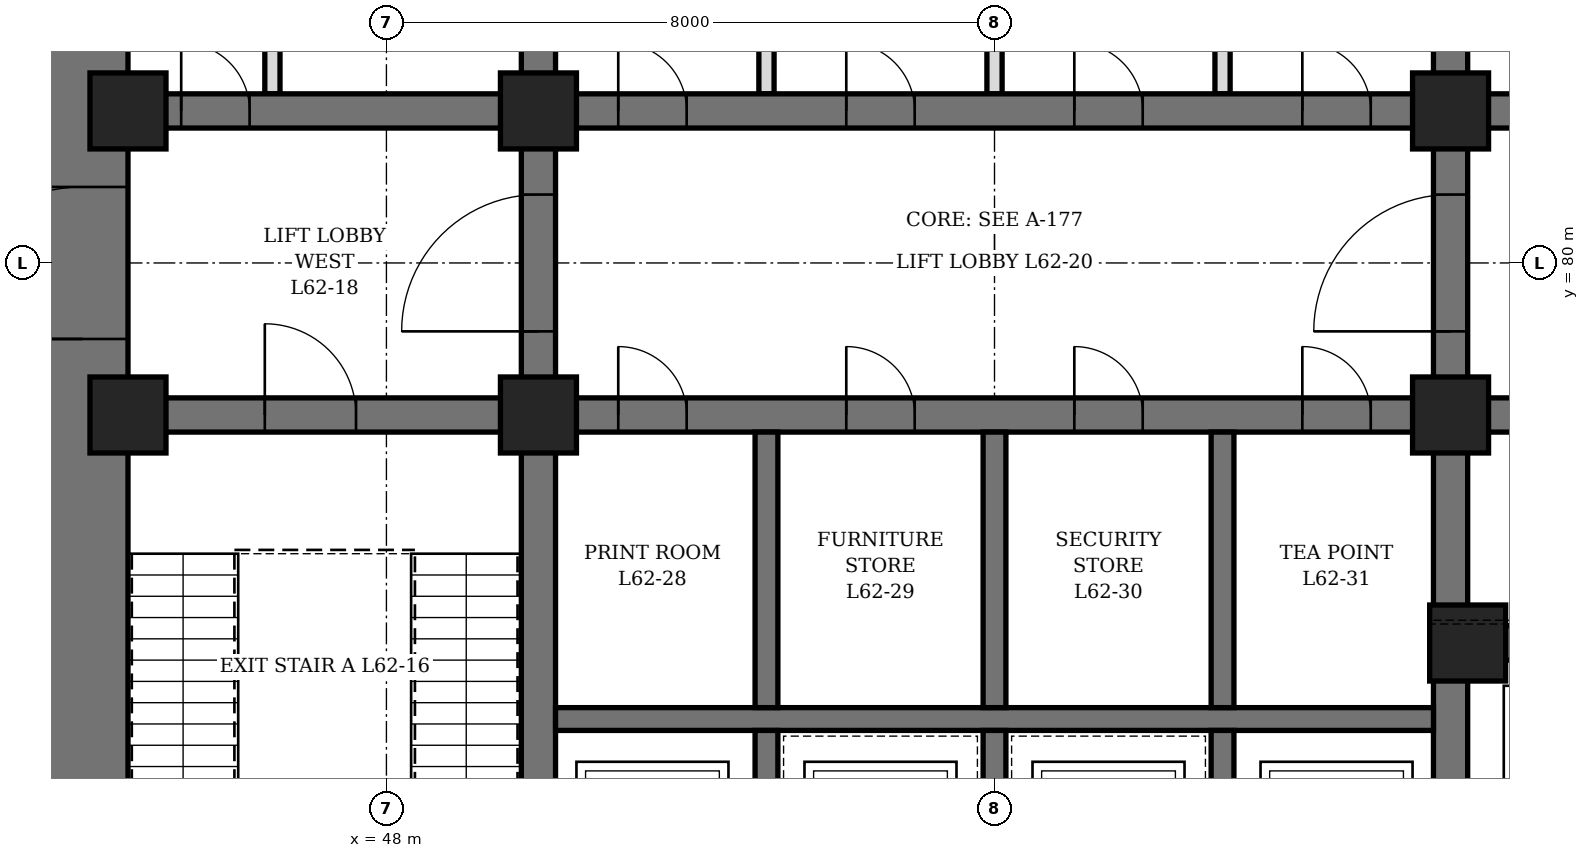
"""IFC4 building model, lengths in metres.
Left out: names, types, materials, properties, quantities, classifications, styles, units other than length and angle.
Written with IfcOpenShell. Run it as: python <this file> out.ifc"""

import sys

from ifc_helpers import new_model, si_unit, direction, frame, frame_2d, origin, origin_2d, place, context, subcontext, project, spatial, rectangle, hollow_rectangle, extrude, element, fill, save


model = new_model("IFC4")
c1 = context("Model", 3, precision=1e-05, world=origin(), true_north=direction((0.0, 1.0)))
c2 = subcontext(c1, "Body", "Model", "MODEL_VIEW")
j1 = project(units=[si_unit("LENGTHUNIT", "METRE"), si_unit("PLANEANGLEUNIT", "RADIAN")], contexts=[c1])
p1 = place(None, origin())
s1 = spatial("IfcSite", under=j1, at=p1, CompositionType="ELEMENT")
p2 = place(p1, origin())
s2 = spatial("IfcBuilding", under=s1, at=p2, CompositionType="ELEMENT")
p3 = place(p2, frame((0.0, 0.0, 275.5)))
s3 = spatial("IfcBuildingStorey", under=s2, at=p3, CompositionType="ELEMENT", Elevation=275.5)
p4 = place(p3, frame((44.0, 70.4, 0.0), z_axis=(0.0, 0.0, 1.0), x_axis=(0.0, 1.0, 0.0)))
e1 = element("IfcWall", 1, at=p4, inside=s3, PredefinedType="SHEAR", context=c2, shape_type="SweptSolid", body=[
    extrude(rectangle(XDim=19.2, YDim=1.2, at=frame_2d((9.6, 0.0))), origin(), (0.0, 0.0, 1.0), 4.2),
])
p5 = place(p4, frame((8.6, 0.0, 0.0)))
e2 = element("IfcOpeningElement", 2, at=p5, cuts=e1, PredefinedType="OPENING", context=c2, shape_type="SweptSolid", body=[
    extrude(rectangle(XDim=2.0, YDim=2.4, at=frame_2d((1.0, 1.2))), frame((0.0, 0.61, 0.0), z_axis=(0.0, -1.0, 0.0), x_axis=(1.0, 0.0, 0.0)), (0.0, 0.0, 1.0), 1.22),
])
p6 = place(p3, frame((50.0, 71.6, 0.0), z_axis=(0.0, 0.0, 1.0), x_axis=(0.0, 1.0, 0.0)))
e3 = element("IfcWall", 3, at=p6, inside=s3, PredefinedType="SHEAR", context=c2, shape_type="SweptSolid", body=[
    extrude(rectangle(XDim=16.8, YDim=0.45, at=frame_2d((8.4, 0.0))), origin(), (0.0, 0.0, 1.0), 4.2),
])
p7 = place(p6, frame((7.5, 0.0, 0.0)))
e4 = element("IfcOpeningElement", 4, at=p7, cuts=e3, PredefinedType="OPENING", context=c2, shape_type="SweptSolid", body=[
    extrude(rectangle(XDim=1.8, YDim=2.4, at=frame_2d((0.9, 1.2))), frame((0.0, 0.235, 0.0), z_axis=(0.0, -1.0, 0.0), x_axis=(1.0, 0.0, 0.0)), (0.0, 0.0, 1.0), 0.47),
])
p8 = place(p3, frame((62.0, 71.6, 0.0), z_axis=(0.0, 0.0, 1.0), x_axis=(0.0, 1.0, 0.0)))
e5 = element("IfcWall", 5, at=p8, inside=s3, PredefinedType="SHEAR", context=c2, shape_type="SweptSolid", body=[
    extrude(rectangle(XDim=16.8, YDim=0.45, at=frame_2d((8.4, 0.0))), origin(), (0.0, 0.0, 1.0), 4.2),
])
p9 = place(p8, frame((7.5, 0.0, 0.0)))
e6 = element("IfcOpeningElement", 6, at=p9, cuts=e5, PredefinedType="OPENING", context=c2, shape_type="SweptSolid", body=[
    extrude(rectangle(XDim=1.8, YDim=2.4, at=frame_2d((0.9, 1.2))), frame((0.0, 0.235, 0.0), z_axis=(0.0, -1.0, 0.0), x_axis=(1.0, 0.0, 0.0)), (0.0, 0.0, 1.0), 0.47),
])
p10 = place(p3, frame((44.6, 78.0, 0.0), z_axis=(0.0, 0.0, 1.0), x_axis=(1.0, 0.0, 0.0)))
e7 = element("IfcWall", 7, at=p10, inside=s3, PredefinedType="SHEAR", context=c2, shape_type="SweptSolid", body=[
    extrude(rectangle(XDim=5.175, YDim=0.45, at=frame_2d((2.587, 0.0))), origin(), (0.0, 0.0, 1.0), 4.2),
])
p11 = place(p10, frame((1.8, 0.0, 0.0)))
e8 = element("IfcOpeningElement", 8, at=p11, cuts=e7, PredefinedType="OPENING", context=c2, shape_type="SweptSolid", body=[
    extrude(rectangle(XDim=1.2, YDim=2.1, at=frame_2d((0.6, 1.05))), frame((0.0, 0.235, 0.0), z_axis=(0.0, -1.0, 0.0), x_axis=(1.0, 0.0, 0.0)), (0.0, 0.0, 1.0), 0.47),
])
p12 = place(p3, frame((44.6, 82.0, 0.0), z_axis=(0.0, 0.0, 1.0), x_axis=(1.0, 0.0, 0.0)))
e9 = element("IfcWall", 9, at=p12, inside=s3, PredefinedType="SHEAR", context=c2, shape_type="SweptSolid", body=[
    extrude(rectangle(XDim=5.175, YDim=0.45, at=frame_2d((2.587, 0.0))), origin(), (0.0, 0.0, 1.0), 4.2),
])
p13 = place(p12, frame((0.7, 0.0, 0.0)))
e10 = element("IfcOpeningElement", 10, at=p13, cuts=e9, PredefinedType="OPENING", context=c2, shape_type="SweptSolid", body=[
    extrude(rectangle(XDim=0.9, YDim=2.1, at=frame_2d((0.45, 1.05))), frame((0.0, 0.235, 0.0), z_axis=(0.0, -1.0, 0.0), x_axis=(1.0, 0.0, 0.0)), (0.0, 0.0, 1.0), 0.47),
])
p14 = place(p3, frame((62.225, 75.0, 0.0), z_axis=(0.0, 0.0, 1.0), x_axis=(1.0, 0.0, 0.0)))
e11 = element("IfcWall", 11, at=p14, inside=s3, PredefinedType="SHEAR", context=c2, shape_type="SweptSolid", body=[
    extrude(rectangle(XDim=5.175, YDim=0.45, at=frame_2d((2.587, 0.0))), origin(), (0.0, 0.0, 1.0), 4.2),
])
p15 = place(p14, frame((0.675, 0.0, 0.0)))
e12 = element("IfcOpeningElement", 12, at=p15, cuts=e11, PredefinedType="OPENING", context=c2, shape_type="SweptSolid", body=[
    extrude(rectangle(XDim=1.2, YDim=2.2, at=frame_2d((0.6, 1.1))), frame((0.0, 0.235, 0.0), z_axis=(0.0, -1.0, 0.0), x_axis=(1.0, 0.0, 0.0)), (0.0, 0.0, 1.0), 0.47),
])
p16 = place(p14, frame((3.425, 0.0, 0.0)))
e13 = element("IfcOpeningElement", 13, at=p16, cuts=e11, PredefinedType="OPENING", context=c2, shape_type="SweptSolid", body=[
    extrude(rectangle(XDim=1.2, YDim=2.2, at=frame_2d((0.6, 1.1))), frame((0.0, 0.235, 0.0), z_axis=(0.0, -1.0, 0.0), x_axis=(1.0, 0.0, 0.0)), (0.0, 0.0, 1.0), 0.47),
])
p17 = place(p3, frame((62.225, 78.0, 0.0), z_axis=(0.0, 0.0, 1.0), x_axis=(1.0, 0.0, 0.0)))
e14 = element("IfcWall", 14, at=p17, inside=s3, PredefinedType="SHEAR", context=c2, shape_type="SweptSolid", body=[
    extrude(rectangle(XDim=5.175, YDim=0.45, at=frame_2d((2.587, 0.0))), origin(), (0.0, 0.0, 1.0), 4.2),
])
p18 = place(p17, frame((2.175, 0.0, 0.0)))
e15 = element("IfcOpeningElement", 15, at=p18, cuts=e14, PredefinedType="OPENING", context=c2, shape_type="SweptSolid", body=[
    extrude(rectangle(XDim=1.2, YDim=2.1, at=frame_2d((0.6, 1.05))), frame((0.0, 0.235, 0.0), z_axis=(0.0, -1.0, 0.0), x_axis=(1.0, 0.0, 0.0)), (0.0, 0.0, 1.0), 0.47),
])
p19 = place(p3, frame((62.225, 82.0, 0.0), z_axis=(0.0, 0.0, 1.0), x_axis=(1.0, 0.0, 0.0)))
e16 = element("IfcWall", 16, at=p19, inside=s3, PredefinedType="SHEAR", context=c2, shape_type="SweptSolid", body=[
    extrude(rectangle(XDim=5.175, YDim=0.45, at=frame_2d((2.587, 0.0))), origin(), (0.0, 0.0, 1.0), 4.2),
])
p20 = place(p19, frame((2.175, 0.0, 0.0)))
e17 = element("IfcOpeningElement", 17, at=p20, cuts=e16, PredefinedType="OPENING", context=c2, shape_type="SweptSolid", body=[
    extrude(rectangle(XDim=1.2, YDim=2.1, at=frame_2d((0.6, 1.05))), frame((0.0, 0.235, 0.0), z_axis=(0.0, -1.0, 0.0), x_axis=(1.0, 0.0, 0.0)), (0.0, 0.0, 1.0), 0.47),
])
p21 = place(p3, frame((50.225, 78.0, 0.0), z_axis=(0.0, 0.0, 1.0), x_axis=(1.0, 0.0, 0.0)))
e18 = element("IfcWall", 18, at=p21, inside=s3, PredefinedType="SHEAR", context=c2, shape_type="SweptSolid", body=[
    extrude(rectangle(XDim=11.55, YDim=0.45, at=frame_2d((5.775, 0.0))), origin(), (0.0, 0.0, 1.0), 4.2),
])
p22 = place(p21, frame((0.825, 0.0, 0.0)))
e19 = element("IfcOpeningElement", 19, at=p22, cuts=e18, PredefinedType="OPENING", context=c2, shape_type="SweptSolid", body=[
    extrude(rectangle(XDim=0.9, YDim=2.1, at=frame_2d((0.45, 1.05))), frame((0.0, 0.235, 0.0), z_axis=(0.0, -1.0, 0.0), x_axis=(1.0, 0.0, 0.0)), (0.0, 0.0, 1.0), 0.47),
])
p23 = place(p21, frame((3.825, 0.0, 0.0)))
e20 = element("IfcOpeningElement", 20, at=p23, cuts=e18, PredefinedType="OPENING", context=c2, shape_type="SweptSolid", body=[
    extrude(rectangle(XDim=0.9, YDim=2.1, at=frame_2d((0.45, 1.05))), frame((0.0, 0.235, 0.0), z_axis=(0.0, -1.0, 0.0), x_axis=(1.0, 0.0, 0.0)), (0.0, 0.0, 1.0), 0.47),
])
p24 = place(p21, frame((6.825, 0.0, 0.0)))
e21 = element("IfcOpeningElement", 21, at=p24, cuts=e18, PredefinedType="OPENING", context=c2, shape_type="SweptSolid", body=[
    extrude(rectangle(XDim=0.9, YDim=2.1, at=frame_2d((0.45, 1.05))), frame((0.0, 0.235, 0.0), z_axis=(0.0, -1.0, 0.0), x_axis=(1.0, 0.0, 0.0)), (0.0, 0.0, 1.0), 0.47),
])
p25 = place(p21, frame((9.825, 0.0, 0.0)))
e22 = element("IfcOpeningElement", 22, at=p25, cuts=e18, PredefinedType="OPENING", context=c2, shape_type="SweptSolid", body=[
    extrude(rectangle(XDim=0.9, YDim=2.1, at=frame_2d((0.45, 1.05))), frame((0.0, 0.235, 0.0), z_axis=(0.0, -1.0, 0.0), x_axis=(1.0, 0.0, 0.0)), (0.0, 0.0, 1.0), 0.47),
])
p26 = place(p3, frame((50.225, 82.0, 0.0), z_axis=(0.0, 0.0, 1.0), x_axis=(1.0, 0.0, 0.0)))
e23 = element("IfcWall", 23, at=p26, inside=s3, PredefinedType="SHEAR", context=c2, shape_type="SweptSolid", body=[
    extrude(rectangle(XDim=11.55, YDim=0.45, at=frame_2d((5.775, 0.0))), origin(), (0.0, 0.0, 1.0), 4.2),
])
p27 = place(p26, frame((0.825, 0.0, 0.0)))
e24 = element("IfcOpeningElement", 24, at=p27, cuts=e23, PredefinedType="OPENING", context=c2, shape_type="SweptSolid", body=[
    extrude(rectangle(XDim=0.9, YDim=2.1, at=frame_2d((0.45, 1.05))), frame((0.0, 0.235, 0.0), z_axis=(0.0, -1.0, 0.0), x_axis=(1.0, 0.0, 0.0)), (0.0, 0.0, 1.0), 0.47),
])
p28 = place(p26, frame((3.825, 0.0, 0.0)))
e25 = element("IfcOpeningElement", 25, at=p28, cuts=e23, PredefinedType="OPENING", context=c2, shape_type="SweptSolid", body=[
    extrude(rectangle(XDim=0.9, YDim=2.1, at=frame_2d((0.45, 1.05))), frame((0.0, 0.235, 0.0), z_axis=(0.0, -1.0, 0.0), x_axis=(1.0, 0.0, 0.0)), (0.0, 0.0, 1.0), 0.47),
])
p29 = place(p26, frame((6.825, 0.0, 0.0)))
e26 = element("IfcOpeningElement", 26, at=p29, cuts=e23, PredefinedType="OPENING", context=c2, shape_type="SweptSolid", body=[
    extrude(rectangle(XDim=0.9, YDim=2.1, at=frame_2d((0.45, 1.05))), frame((0.0, 0.235, 0.0), z_axis=(0.0, -1.0, 0.0), x_axis=(1.0, 0.0, 0.0)), (0.0, 0.0, 1.0), 0.47),
])
p30 = place(p26, frame((9.825, 0.0, 0.0)))
e27 = element("IfcOpeningElement", 27, at=p30, cuts=e23, PredefinedType="OPENING", context=c2, shape_type="SweptSolid", body=[
    extrude(rectangle(XDim=0.9, YDim=2.1, at=frame_2d((0.45, 1.05))), frame((0.0, 0.235, 0.0), z_axis=(0.0, -1.0, 0.0), x_axis=(1.0, 0.0, 0.0)), (0.0, 0.0, 1.0), 0.47),
])
p31 = place(p3, frame((50.225, 74.0, 0.0), z_axis=(0.0, 0.0, 1.0), x_axis=(1.0, 0.0, 0.0)))
e28 = element("IfcWall", 28, at=p31, inside=s3, PredefinedType="SHEAR", context=c2, shape_type="SweptSolid", body=[
    extrude(rectangle(XDim=11.55, YDim=0.3, at=frame_2d((5.775, 0.0))), origin(), (0.0, 0.0, 1.0), 4.2),
])
p32 = place(p3, frame((53.0, 71.6, 0.0), z_axis=(0.0, 0.0, 1.0), x_axis=(0.0, 1.0, 0.0)))
e29 = element("IfcWall", 29, at=p32, inside=s3, PredefinedType="SHEAR", context=c2, shape_type="SweptSolid", body=[
    extrude(rectangle(XDim=2.25, YDim=0.3, at=frame_2d((1.125, 0.0))), origin(), (0.0, 0.0, 1.0), 4.2),
])
p33 = place(p3, frame((53.0, 74.15, 0.0), z_axis=(0.0, 0.0, 1.0), x_axis=(0.0, 1.0, 0.0)))
e30 = element("IfcWall", 30, at=p33, inside=s3, PredefinedType="SHEAR", context=c2, shape_type="SweptSolid", body=[
    extrude(rectangle(XDim=3.625, YDim=0.3, at=frame_2d((1.812, 0.0))), origin(), (0.0, 0.0, 1.0), 4.2),
])
p34 = place(p3, frame((56.0, 71.6, 0.0), z_axis=(0.0, 0.0, 1.0), x_axis=(0.0, 1.0, 0.0)))
e31 = element("IfcWall", 31, at=p34, inside=s3, PredefinedType="SHEAR", context=c2, shape_type="SweptSolid", body=[
    extrude(rectangle(XDim=2.25, YDim=0.3, at=frame_2d((1.125, 0.0))), origin(), (0.0, 0.0, 1.0), 4.2),
])
p35 = place(p3, frame((56.0, 74.15, 0.0), z_axis=(0.0, 0.0, 1.0), x_axis=(0.0, 1.0, 0.0)))
e32 = element("IfcWall", 32, at=p35, inside=s3, PredefinedType="SHEAR", context=c2, shape_type="SweptSolid", body=[
    extrude(rectangle(XDim=3.625, YDim=0.3, at=frame_2d((1.812, 0.0))), origin(), (0.0, 0.0, 1.0), 4.2),
])
p36 = place(p3, frame((59.0, 71.6, 0.0), z_axis=(0.0, 0.0, 1.0), x_axis=(0.0, 1.0, 0.0)))
e33 = element("IfcWall", 33, at=p36, inside=s3, PredefinedType="SHEAR", context=c2, shape_type="SweptSolid", body=[
    extrude(rectangle(XDim=2.25, YDim=0.3, at=frame_2d((1.125, 0.0))), origin(), (0.0, 0.0, 1.0), 4.2),
])
p37 = place(p3, frame((59.0, 74.15, 0.0), z_axis=(0.0, 0.0, 1.0), x_axis=(0.0, 1.0, 0.0)))
e34 = element("IfcWall", 34, at=p37, inside=s3, PredefinedType="SHEAR", context=c2, shape_type="SweptSolid", body=[
    extrude(rectangle(XDim=3.625, YDim=0.3, at=frame_2d((1.812, 0.0))), origin(), (0.0, 0.0, 1.0), 4.2),
])
for number, where, z_axis, x_axis in (
    (35, (44.6, 78.0, 0.0), (0.0, 0.0, 1.0), (1.0, 0.0, 0.0)),
    (36, (44.6, 82.0, 0.0), (0.0, 0.0, 1.0), (1.0, 0.0, 0.0)),
    (37, (50.0, 78.0, 0.0), (0.0, 0.0, 1.0), (1.0, 0.0, 0.0)),
    (38, (50.0, 82.0, 0.0), (0.0, 0.0, 1.0), (1.0, 0.0, 0.0)),
    (39, (62.0, 78.0, 0.0), (0.0, 0.0, 1.0), (1.0, 0.0, 0.0)),
    (40, (62.0, 82.0, 0.0), (0.0, 0.0, 1.0), (1.0, 0.0, 0.0)),
    (41, (62.225, 75.0, 0.0), (0.0, 0.0, 1.0), (1.0, 0.0, 0.0)),
):
    element("IfcColumn", number, at=place(p3, frame(where, z_axis=z_axis, x_axis=x_axis)), inside=s3, PredefinedType="COLUMN", context=c2, shape_type="SweptSolid", body=[
        extrude(hollow_rectangle(XDim=1.0, YDim=1.0, WallThickness=0.15, at=origin_2d()), origin(), (0.0, 0.0, 1.0), 4.2),
    ])
p38 = place(p3, frame((46.5, 82.225, 0.0), z_axis=(0.0, 0.0, 1.0), x_axis=(0.0, 1.0, 0.0)))
e42 = element("IfcWall", 42, at=p38, inside=s3, PredefinedType="PARTITIONING", context=c2, shape_type="SweptSolid", body=[
    extrude(rectangle(XDim=3.05, YDim=0.2, at=frame_2d((1.525, 0.0))), origin(), (0.0, 0.0, 1.0), 3.95),
])
p39 = place(p38, frame((1.075, 0.0, 0.0)))
e43 = element("IfcOpeningElement", 43, at=p39, cuts=e42, PredefinedType="OPENING", context=c2, shape_type="SweptSolid", body=[
    extrude(rectangle(XDim=0.9, YDim=2.1, at=frame_2d((0.45, 1.05))), frame((0.0, 0.11, 0.0), z_axis=(0.0, -1.0, 0.0), x_axis=(1.0, 0.0, 0.0)), (0.0, 0.0, 1.0), 0.22),
])
p40 = place(p3, frame((53.0, 82.225, 0.0), z_axis=(0.0, 0.0, 1.0), x_axis=(0.0, 1.0, 0.0)))
e44 = element("IfcWall", 44, at=p40, inside=s3, PredefinedType="PARTITIONING", context=c2, shape_type="SweptSolid", body=[
    extrude(rectangle(XDim=3.55, YDim=0.2, at=frame_2d((1.775, 0.0))), origin(), (0.0, 0.0, 1.0), 3.95),
])
p41 = place(p3, frame((56.0, 82.225, 0.0), z_axis=(0.0, 0.0, 1.0), x_axis=(0.0, 1.0, 0.0)))
e45 = element("IfcWall", 45, at=p41, inside=s3, PredefinedType="PARTITIONING", context=c2, shape_type="SweptSolid", body=[
    extrude(rectangle(XDim=3.55, YDim=0.2, at=frame_2d((1.775, 0.0))), origin(), (0.0, 0.0, 1.0), 2.45),
])
p42 = place(p3, frame((59.0, 82.225, 0.0), z_axis=(0.0, 0.0, 1.0), x_axis=(0.0, 1.0, 0.0)))
e46 = element("IfcWall", 46, at=p42, inside=s3, PredefinedType="PARTITIONING", context=c2, shape_type="SweptSolid", body=[
    extrude(rectangle(XDim=3.55, YDim=0.2, at=frame_2d((1.775, 0.0))), origin(), (0.0, 0.0, 1.0), 3.95),
])
p43 = place(p13, origin())
e47 = element("IfcDoor", 47, at=p43, inside=s3, OperationType="SINGLE_SWING_LEFT", PredefinedType="DOOR", context=c2, shape_type="SweptSolid", body=[
    extrude(rectangle(XDim=0.9, YDim=2.1, at=frame_2d((0.45, 1.05))), frame((0.0, 0.225, 0.0), z_axis=(0.0, -1.0, 0.0), x_axis=(1.0, 0.0, 0.0)), (0.0, 0.0, 1.0), 0.449),
])
fill(e10, e47)
p44 = place(p22, origin())
e48 = element("IfcDoor", 48, at=p44, inside=s3, OperationType="SINGLE_SWING_LEFT", PredefinedType="DOOR", context=c2, shape_type="SweptSolid", body=[
    extrude(rectangle(XDim=0.9, YDim=2.1, at=frame_2d((0.45, 1.05))), frame((0.0, 0.225, 0.0), z_axis=(0.0, -1.0, 0.0), x_axis=(1.0, 0.0, 0.0)), (0.0, 0.0, 1.0), 0.449),
])
fill(e19, e48)
p45 = place(p23, origin())
e49 = element("IfcDoor", 49, at=p45, inside=s3, OperationType="SINGLE_SWING_LEFT", PredefinedType="DOOR", context=c2, shape_type="SweptSolid", body=[
    extrude(rectangle(XDim=0.9, YDim=2.1, at=frame_2d((0.45, 1.05))), frame((0.0, 0.225, 0.0), z_axis=(0.0, -1.0, 0.0), x_axis=(1.0, 0.0, 0.0)), (0.0, 0.0, 1.0), 0.449),
])
fill(e20, e49)
p46 = place(p24, origin())
e50 = element("IfcDoor", 50, at=p46, inside=s3, OperationType="SINGLE_SWING_LEFT", PredefinedType="DOOR", context=c2, shape_type="SweptSolid", body=[
    extrude(rectangle(XDim=0.9, YDim=2.1, at=frame_2d((0.45, 1.05))), frame((0.0, 0.225, 0.0), z_axis=(0.0, -1.0, 0.0), x_axis=(1.0, 0.0, 0.0)), (0.0, 0.0, 1.0), 0.449),
])
fill(e21, e50)
p47 = place(p25, origin())
e51 = element("IfcDoor", 51, at=p47, inside=s3, OperationType="SINGLE_SWING_LEFT", PredefinedType="DOOR", context=c2, shape_type="SweptSolid", body=[
    extrude(rectangle(XDim=0.9, YDim=2.1, at=frame_2d((0.45, 1.05))), frame((0.0, 0.225, 0.0), z_axis=(0.0, -1.0, 0.0), x_axis=(1.0, 0.0, 0.0)), (0.0, 0.0, 1.0), 0.449),
])
fill(e22, e51)
p48 = place(p27, origin())
e52 = element("IfcDoor", 52, at=p48, inside=s3, OperationType="SINGLE_SWING_LEFT", PredefinedType="DOOR", context=c2, shape_type="SweptSolid", body=[
    extrude(rectangle(XDim=0.9, YDim=2.1, at=frame_2d((0.45, 1.05))), frame((0.0, 0.225, 0.0), z_axis=(0.0, -1.0, 0.0), x_axis=(1.0, 0.0, 0.0)), (0.0, 0.0, 1.0), 0.449),
])
fill(e24, e52)
p49 = place(p28, origin())
e53 = element("IfcDoor", 53, at=p49, inside=s3, OperationType="SINGLE_SWING_LEFT", PredefinedType="DOOR", context=c2, shape_type="SweptSolid", body=[
    extrude(rectangle(XDim=0.9, YDim=2.1, at=frame_2d((0.45, 1.05))), frame((0.0, 0.225, 0.0), z_axis=(0.0, -1.0, 0.0), x_axis=(1.0, 0.0, 0.0)), (0.0, 0.0, 1.0), 0.449),
])
fill(e25, e53)
p50 = place(p29, origin())
e54 = element("IfcDoor", 54, at=p50, inside=s3, OperationType="SINGLE_SWING_LEFT", PredefinedType="DOOR", context=c2, shape_type="SweptSolid", body=[
    extrude(rectangle(XDim=0.9, YDim=2.1, at=frame_2d((0.45, 1.05))), frame((0.0, 0.225, 0.0), z_axis=(0.0, -1.0, 0.0), x_axis=(1.0, 0.0, 0.0)), (0.0, 0.0, 1.0), 0.449),
])
fill(e26, e54)
p51 = place(p30, origin())
e55 = element("IfcDoor", 55, at=p51, inside=s3, OperationType="SINGLE_SWING_LEFT", PredefinedType="DOOR", context=c2, shape_type="SweptSolid", body=[
    extrude(rectangle(XDim=0.9, YDim=2.1, at=frame_2d((0.45, 1.05))), frame((0.0, 0.225, 0.0), z_axis=(0.0, -1.0, 0.0), x_axis=(1.0, 0.0, 0.0)), (0.0, 0.0, 1.0), 0.449),
])
fill(e27, e55)
p52 = place(p11, origin())
e56 = element("IfcDoor", 56, at=p52, inside=s3, OperationType="SINGLE_SWING_LEFT", PredefinedType="DOOR", context=c2, shape_type="SweptSolid", body=[
    extrude(rectangle(XDim=1.2, YDim=2.1, at=frame_2d((0.6, 1.05))), frame((0.0, 0.225, 0.0), z_axis=(0.0, -1.0, 0.0), x_axis=(1.0, 0.0, 0.0)), (0.0, 0.0, 1.0), 0.449),
])
fill(e8, e56)
p53 = place(p5, origin())
e57 = element("IfcDoor", 57, at=p53, inside=s3, OperationType="DOUBLE_DOOR_SINGLE_SWING", PredefinedType="DOOR", context=c2, shape_type="SweptSolid", body=[
    extrude(rectangle(XDim=2.0, YDim=2.4, at=frame_2d((1.0, 1.2))), frame((0.0, 0.35, 0.0), z_axis=(0.0, -1.0, 0.0), x_axis=(1.0, 0.0, 0.0)), (0.0, 0.0, 1.0), 0.7),
])
fill(e2, e57)
p54 = place(p7, origin())
e58 = element("IfcDoor", 58, at=p54, inside=s3, OperationType="DOUBLE_DOOR_SINGLE_SWING", PredefinedType="DOOR", context=c2, shape_type="SweptSolid", body=[
    extrude(rectangle(XDim=1.8, YDim=2.4, at=frame_2d((0.9, 1.2))), frame((0.0, 0.225, 0.0), z_axis=(0.0, -1.0, 0.0), x_axis=(1.0, 0.0, 0.0)), (0.0, 0.0, 1.0), 0.449),
])
fill(e4, e58)
p55 = place(p9, origin())
e59 = element("IfcDoor", 59, at=p55, inside=s3, OperationType="DOUBLE_DOOR_SINGLE_SWING", PredefinedType="DOOR", context=c2, shape_type="SweptSolid", body=[
    extrude(rectangle(XDim=1.8, YDim=2.4, at=frame_2d((0.9, 1.2))), frame((0.0, 0.225, 0.0), z_axis=(0.0, -1.0, 0.0), x_axis=(1.0, 0.0, 0.0)), (0.0, 0.0, 1.0), 0.449),
])
fill(e6, e59)
save(model, sys.argv[1])
